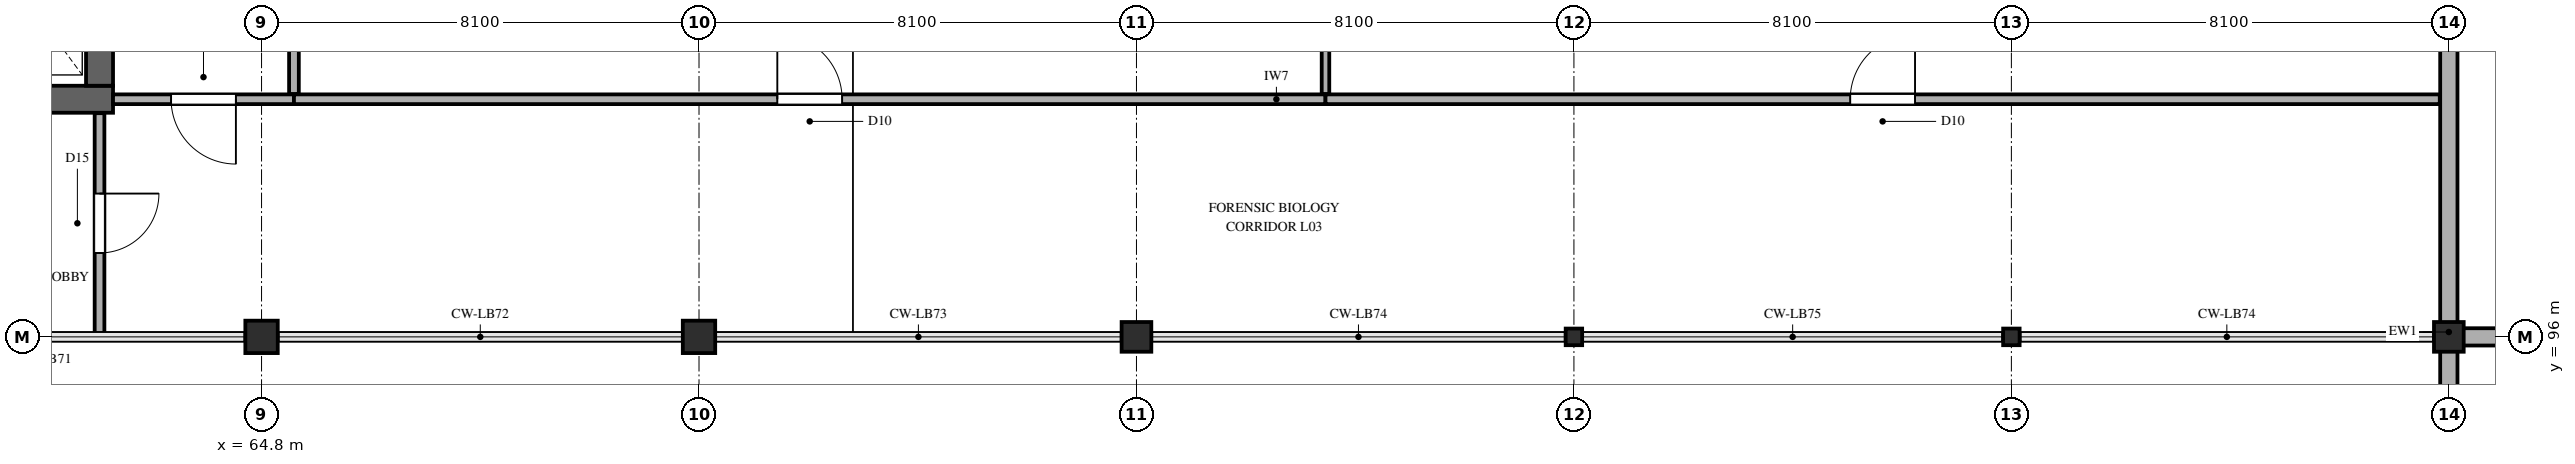
"""IFC4 building model, lengths in metres.
Left out: names, types, materials, properties, quantities, classifications, styles, units other than length and angle.
Written with IfcOpenShell. Run it as: python <this file> out.ifc"""

import sys

from ifc_helpers import new_model, si_unit, direction, frame, frame_2d, origin, origin_2d, place, context, subcontext, project, spatial, rectangle, i_section, extrude, element, fill, save


model = new_model("IFC4")
c1 = context("Model", 3, precision=1e-05, world=origin(), true_north=direction((0.0, 1.0)))
c2 = subcontext(c1, "Body", "Model", "MODEL_VIEW")
j1 = project(units=[si_unit("LENGTHUNIT", "METRE"), si_unit("PLANEANGLEUNIT", "RADIAN")], contexts=[c1])
p1 = place(None, origin())
s1 = spatial("IfcSite", under=j1, at=p1, CompositionType="ELEMENT")
p2 = place(p1, origin())
s2 = spatial("IfcBuilding", under=s1, at=p2, CompositionType="ELEMENT")
p3 = place(p2, frame((0.0, 0.0, 14.7)))
s3 = spatial("IfcBuildingStorey", under=s2, at=p3, CompositionType="ELEMENT", Elevation=14.7)
p4 = place(p3, frame((46.75, 100.4, 0.0), z_axis=(0.0, 0.0, 1.0), x_axis=(1.0, 0.0, 0.0)))
e1 = element("IfcWall", 1, at=p4, inside=s3, PredefinedType="SHEAR", context=c2, shape_type="SweptSolid", body=[
    extrude(rectangle(XDim=15.3, YDim=0.5, at=frame_2d((7.65, 0.0))), origin(), (0.0, 0.0, 1.0), 5.1),
])
p5 = place(p4, frame((1.0, 0.0, 0.0)))
e2 = element("IfcOpeningElement", 2, at=p5, cuts=e1, PredefinedType="OPENING", context=c2, shape_type="SweptSolid", body=[
    extrude(rectangle(XDim=1.15, YDim=2.25, at=frame_2d((0.575, 1.125))), frame((0.0, 0.26, 0.0), z_axis=(0.0, -1.0, 0.0), x_axis=(1.0, 0.0, 0.0)), (0.0, 0.0, 1.0), 0.52),
])
p6 = place(p4, frame((10.282, 0.0, 0.0)))
e3 = element("IfcOpeningElement", 3, at=p6, cuts=e1, PredefinedType="OPENING", context=c2, shape_type="SweptSolid", body=[
    extrude(rectangle(XDim=1.1, YDim=2.2, at=frame_2d((0.55, 1.1))), frame((0.0, 0.26, 0.0), z_axis=(0.0, -1.0, 0.0), x_axis=(1.0, 0.0, 0.0)), (0.0, 0.0, 1.0), 0.52),
])
p7 = place(p4, frame((12.998, 0.0, 0.0)))
e4 = element("IfcOpeningElement", 4, at=p7, cuts=e1, PredefinedType="OPENING", context=c2, shape_type="SweptSolid", body=[
    extrude(rectangle(XDim=1.1, YDim=2.2, at=frame_2d((0.55, 1.1))), frame((0.0, 0.26, 0.0), z_axis=(0.0, -1.0, 0.0), x_axis=(1.0, 0.0, 0.0)), (0.0, 0.0, 1.0), 0.52),
])
p8 = place(p3, frame((61.8, 100.65, 0.0), z_axis=(0.0, 0.0, 1.0), x_axis=(0.0, 1.0, 0.0)))
e5 = element("IfcWall", 5, at=p8, inside=s3, PredefinedType="SHEAR", context=c2, shape_type="SweptSolid", body=[
    extrude(rectangle(XDim=7.9, YDim=0.5, at=frame_2d((3.95, 0.0))), origin(), (0.0, 0.0, 1.0), 5.1),
])
for number, where, z_axis, x_axis in (
    (6, (64.8, 96.0, 0.0), (0.0, 0.0, 1.0), (1.0, 0.0, 0.0)),
    (7, (72.9, 96.0, 0.0), (0.0, 0.0, 1.0), (1.0, 0.0, 0.0)),
):
    element("IfcColumn", number, at=place(p3, frame(where, z_axis=z_axis, x_axis=x_axis)), inside=s3, PredefinedType="COLUMN", context=c2, shape_type="SweptSolid", body=[
        extrude(rectangle(XDim=0.6, YDim=0.6, at=origin_2d()), origin(), (0.0, 0.0, 1.0), 5.1),
    ])
p9 = place(p3, frame((81.0, 96.0, 0.0), z_axis=(0.0, 0.0, 1.0), x_axis=(1.0, 0.0, 0.0)))
e8 = element("IfcColumn", 8, at=p9, inside=s3, PredefinedType="COLUMN", context=c2, shape_type="SweptSolid", body=[
    extrude(rectangle(XDim=0.55, YDim=0.55, at=origin_2d()), origin(), (0.0, 0.0, 1.0), 5.1),
])
for number, where, z_axis, x_axis in (
    (9, (89.1, 96.0, 0.0), (0.0, 0.0, 1.0), (1.0, 0.0, 0.0)),
    (10, (97.2, 96.0, 0.0), (0.0, 0.0, 1.0), (1.0, 0.0, 0.0)),
):
    element("IfcColumn", number, at=place(p3, frame(where, z_axis=z_axis, x_axis=x_axis)), inside=s3, PredefinedType="COLUMN", context=c2, shape_type="SweptSolid", body=[
        extrude(i_section(OverallWidth=0.305, OverallDepth=0.308, WebThickness=0.01, FlangeThickness=0.015, FilletRadius=0.015, at=origin_2d()), origin(), (0.0, 0.0, 1.0), 5.1),
    ])
p10 = place(p3, frame((105.3, 96.0, 0.0), z_axis=(0.0, 0.0, 1.0), x_axis=(1.0, 0.0, 0.0)))
e11 = element("IfcColumn", 11, at=p10, inside=s3, PredefinedType="COLUMN", context=c2, shape_type="SweptSolid", body=[
    extrude(rectangle(XDim=0.55, YDim=0.55, at=origin_2d()), origin(), (0.0, 0.0, 1.0), 5.1),
])
p11 = place(p3, frame((117.54, 96.0, 0.0), z_axis=(0.0, 0.0, 1.0), x_axis=(-1.0, 0.0, 0.0)))
e12 = element("IfcWall", 12, at=p11, inside=s3, PredefinedType="SOLIDWALL", context=c2, shape_type="SweptSolid", body=[
    extrude(rectangle(XDim=12.06, YDim=0.32, at=frame_2d((6.03, 0.0))), origin(), (0.0, 0.0, 1.0), 4.144),
])
p12 = place(p11, frame((7.2, 0.0, 0.85)))
e13 = element("IfcOpeningElement", 13, at=p12, cuts=e12, PredefinedType="OPENING", context=c2, shape_type="SweptSolid", body=[
    extrude(rectangle(XDim=1.8, YDim=2.1, at=frame_2d((0.9, 1.05))), frame((0.0, 0.17, 0.0), z_axis=(0.0, -1.0, 0.0), x_axis=(1.0, 0.0, 0.0)), (0.0, 0.0, 1.0), 0.34),
])
p13 = place(p3, frame((105.3, 96.18, 0.0), z_axis=(0.0, 0.0, 1.0), x_axis=(0.0, 1.0, 0.0)))
e14 = element("IfcWall", 14, at=p13, inside=s3, PredefinedType="SOLIDWALL", context=c2, shape_type="SweptSolid", body=[
    extrude(rectangle(XDim=15.82, YDim=0.32, at=frame_2d((7.91, 0.0))), origin(), (0.0, 0.0, 1.0), 4.332),
])
p14 = place(p13, frame((9.45, 0.0, 0.85)))
e15 = element("IfcOpeningElement", 15, at=p14, cuts=e14, PredefinedType="OPENING", context=c2, shape_type="SweptSolid", body=[
    extrude(rectangle(XDim=1.8, YDim=2.4, at=frame_2d((0.9, 1.2))), frame((0.0, 0.17, 0.0), z_axis=(0.0, -1.0, 0.0), x_axis=(1.0, 0.0, 0.0)), (0.0, 0.0, 1.0), 0.34),
])
p15 = place(p3, frame((105.3, 95.82, 0.0), z_axis=(0.0, 0.0, 1.0), x_axis=(0.0, -1.0, 0.0)))
e16 = element("IfcWall", 16, at=p15, inside=s3, PredefinedType="SOLIDWALL", context=c2, shape_type="SweptSolid", body=[
    extrude(rectangle(XDim=15.64, YDim=0.32, at=frame_2d((7.82, 0.0))), origin(), (0.0, 0.0, 1.0), 4.332),
])
p16 = place(p15, frame((4.95, 0.0, 0.85)))
e17 = element("IfcOpeningElement", 17, at=p16, cuts=e16, PredefinedType="OPENING", context=c2, shape_type="SweptSolid", body=[
    extrude(rectangle(XDim=0.75, YDim=2.2, at=frame_2d((0.375, 1.1))), frame((0.0, 0.17, 0.0), z_axis=(0.0, -1.0, 0.0), x_axis=(1.0, 0.0, 0.0)), (0.0, 0.0, 1.0), 0.34),
])
p17 = place(p3, frame((62.05, 100.4, 0.0), z_axis=(0.0, 0.0, 1.0), x_axis=(1.0, 0.0, 0.0)))
e18 = element("IfcWall", 18, at=p17, inside=s3, PredefinedType="PARTITIONING", context=c2, shape_type="SweptSolid", body=[
    extrude(rectangle(XDim=3.35, YDim=0.18, at=frame_2d((1.675, 0.0))), origin(), (0.0, 0.0, 1.0), 4.84),
])
p18 = place(p17, frame((1.075, 0.0, 0.0)))
e19 = element("IfcOpeningElement", 19, at=p18, cuts=e18, PredefinedType="OPENING", context=c2, shape_type="SweptSolid", body=[
    extrude(rectangle(XDim=1.2, YDim=2.2, at=frame_2d((0.6, 1.1))), frame((0.0, 0.1, 0.0), z_axis=(0.0, -1.0, 0.0), x_axis=(1.0, 0.0, 0.0)), (0.0, 0.0, 1.0), 0.2),
])
p19 = place(p3, frame((65.4, 100.4, 0.0), z_axis=(0.0, 0.0, 1.0), x_axis=(1.0, 0.0, 0.0)))
e20 = element("IfcWall", 20, at=p19, inside=s3, PredefinedType="PARTITIONING", context=c2, shape_type="SweptSolid", body=[
    extrude(rectangle(XDim=19.1, YDim=0.18, at=frame_2d((9.55, 0.0))), origin(), (0.0, 0.0, 1.0), 4.84),
])
p20 = place(p19, frame((8.95, 0.0, 0.0)))
e21 = element("IfcOpeningElement", 21, at=p20, cuts=e20, PredefinedType="OPENING", context=c2, shape_type="SweptSolid", body=[
    extrude(rectangle(XDim=1.2, YDim=2.3, at=frame_2d((0.6, 1.15))), frame((0.0, 0.1, 0.0), z_axis=(0.0, -1.0, 0.0), x_axis=(1.0, 0.0, 0.0)), (0.0, 0.0, 1.0), 0.2),
])
p21 = place(p3, frame((84.5, 100.4, 0.0), z_axis=(0.0, 0.0, 1.0), x_axis=(1.0, 0.0, 0.0)))
e22 = element("IfcWall", 22, at=p21, inside=s3, PredefinedType="PARTITIONING", context=c2, shape_type="SweptSolid", body=[
    extrude(rectangle(XDim=20.632, YDim=0.18, at=frame_2d((10.316, 0.0))), origin(), (0.0, 0.0, 1.0), 4.84),
])
p22 = place(p21, frame((9.716, 0.0, 0.0)))
e23 = element("IfcOpeningElement", 23, at=p22, cuts=e22, PredefinedType="OPENING", context=c2, shape_type="SweptSolid", body=[
    extrude(rectangle(XDim=1.2, YDim=2.3, at=frame_2d((0.6, 1.15))), frame((0.0, 0.1, 0.0), z_axis=(0.0, -1.0, 0.0), x_axis=(1.0, 0.0, 0.0)), (0.0, 0.0, 1.0), 0.2),
])
p23 = place(p3, frame((61.8, 96.065, 0.0), z_axis=(0.0, 0.0, 1.0), x_axis=(0.0, 1.0, 0.0)))
e24 = element("IfcWall", 24, at=p23, inside=s3, PredefinedType="PARTITIONING", context=c2, shape_type="SweptSolid", body=[
    extrude(rectangle(XDim=4.077, YDim=0.18, at=frame_2d((2.039, 0.0))), origin(), (0.0, 0.0, 1.0), 4.84),
])
p24 = place(p23, frame((1.489, 0.0, 0.0)))
e25 = element("IfcOpeningElement", 25, at=p24, cuts=e24, PredefinedType="OPENING", context=c2, shape_type="SweptSolid", body=[
    extrude(rectangle(XDim=1.1, YDim=2.2, at=frame_2d((0.55, 1.1))), frame((0.0, 0.1, 0.0), z_axis=(0.0, -1.0, 0.0), x_axis=(1.0, 0.0, 0.0)), (0.0, 0.0, 1.0), 0.2),
])
p25 = place(p3, frame((65.4, 100.498, 0.0), z_axis=(0.0, 0.0, 1.0), x_axis=(0.0, 1.0, 0.0)))
e26 = element("IfcWall", 26, at=p25, inside=s3, PredefinedType="PARTITIONING", context=c2, shape_type="SweptSolid", body=[
    extrude(rectangle(XDim=5.667, YDim=0.18, at=frame_2d((2.833, 0.0))), origin(), (0.0, 0.0, 1.0), 4.84),
])
p26 = place(p3, frame((84.5, 100.498, 0.0), z_axis=(0.0, 0.0, 1.0), x_axis=(0.0, 1.0, 0.0)))
e27 = element("IfcWall", 27, at=p26, inside=s3, PredefinedType="PARTITIONING", context=c2, shape_type="SweptSolid", body=[
    extrude(rectangle(XDim=5.667, YDim=0.14, at=frame_2d((2.833, 0.0))), origin(), (0.0, 0.0, 1.0), 4.84),
])
p27 = place(p18, frame((1.2, 0.0, 0.0), z_axis=(0.0, 0.0, 1.0), x_axis=(-1.0, 0.0, 0.0)))
e28 = element("IfcDoor", 28, at=p27, inside=s3, OperationType="SINGLE_SWING_RIGHT", PredefinedType="DOOR", context=c2, shape_type="SweptSolid", body=[
    extrude(rectangle(XDim=1.2, YDim=2.2, at=frame_2d((0.6, 1.1))), frame((0.0, 0.025, 0.0), z_axis=(0.0, -1.0, 0.0), x_axis=(1.0, 0.0, 0.0)), (0.0, 0.0, 1.0), 0.05),
])
fill(e19, e28)
p28 = place(p20, origin())
e29 = element("IfcDoor", 29, at=p28, inside=s3, OperationType="SINGLE_SWING_LEFT", PredefinedType="DOOR", context=c2, shape_type="SweptSolid", body=[
    extrude(rectangle(XDim=1.2, YDim=2.3, at=frame_2d((0.6, 1.15))), frame((0.0, 0.025, 0.0), z_axis=(0.0, -1.0, 0.0), x_axis=(1.0, 0.0, 0.0)), (0.0, 0.0, 1.0), 0.05),
])
fill(e21, e29)
p29 = place(p22, origin())
e30 = element("IfcDoor", 30, at=p29, inside=s3, OperationType="SINGLE_SWING_RIGHT", PredefinedType="DOOR", context=c2, shape_type="SweptSolid", body=[
    extrude(rectangle(XDim=1.2, YDim=2.3, at=frame_2d((0.6, 1.15))), frame((0.0, 0.025, 0.0), z_axis=(0.0, -1.0, 0.0), x_axis=(1.0, 0.0, 0.0)), (0.0, 0.0, 1.0), 0.05),
])
fill(e23, e30)
p30 = place(p24, frame((1.1, 0.0, 0.0), z_axis=(0.0, 0.0, 1.0), x_axis=(-1.0, 0.0, 0.0)))
e31 = element("IfcDoor", 31, at=p30, inside=s3, OperationType="SINGLE_SWING_RIGHT", PredefinedType="DOOR", context=c2, shape_type="SweptSolid", body=[
    extrude(rectangle(XDim=1.1, YDim=2.2, at=frame_2d((0.55, 1.1))), frame((0.0, 0.025, 0.0), z_axis=(0.0, -1.0, 0.0), x_axis=(1.0, 0.0, 0.0)), (0.0, 0.0, 1.0), 0.05),
])
fill(e25, e31)
save(model, sys.argv[1])
